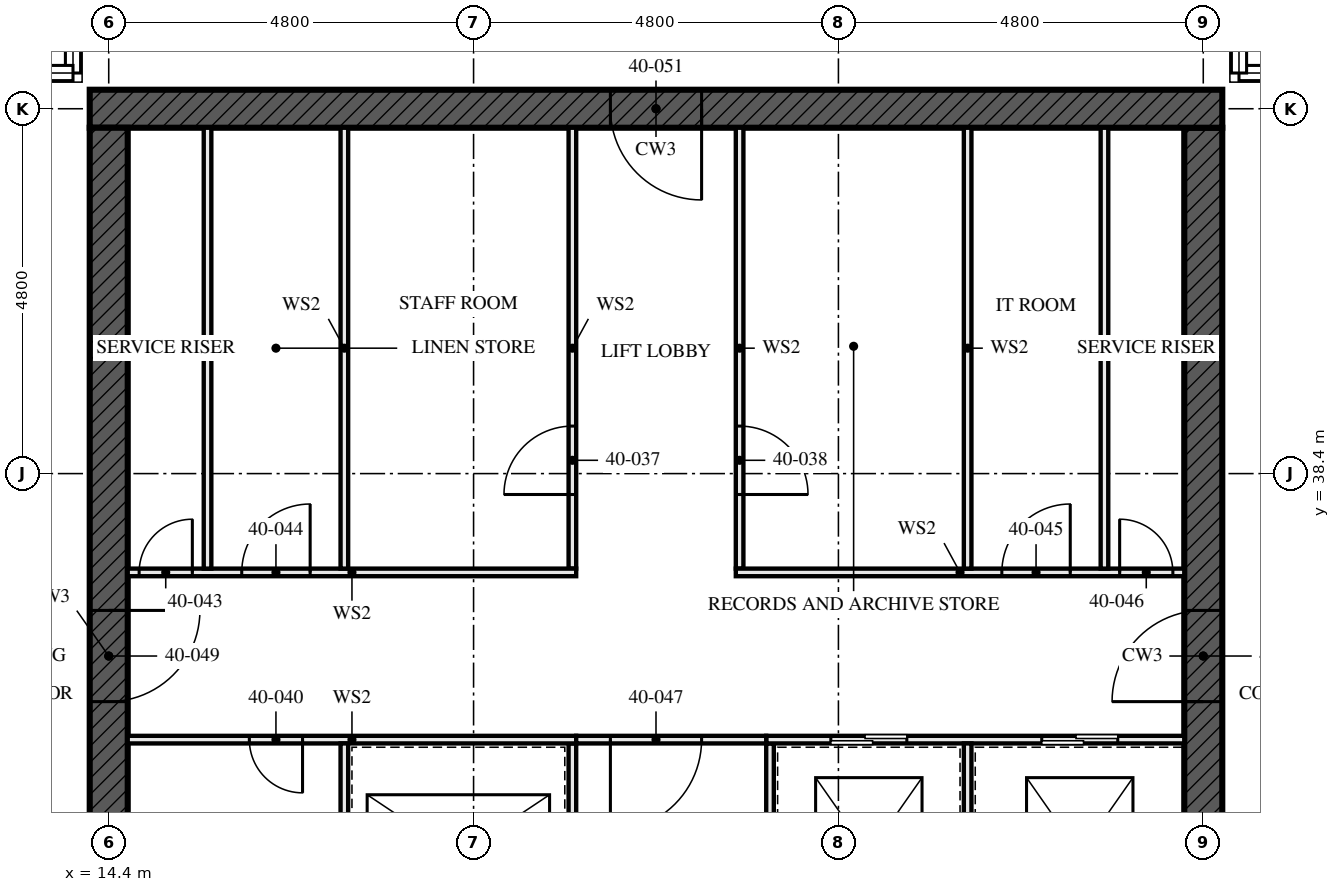
"""IFC4 building model, lengths in metres.
Left out: names, types, materials, properties, quantities, classifications, styles, units other than length and angle.
Written with IfcOpenShell. Run it as: python <this file> out.ifc"""

import sys

from ifc_helpers import new_model, si_unit, direction, frame, frame_2d, origin, place, context, subcontext, project, spatial, rectangle, extrude, element, fill, save


model = new_model("IFC4")
c1 = context("Model", 3, precision=1e-05, world=origin(), true_north=direction((0.0, 1.0)))
c2 = subcontext(c1, "Body", "Model", "MODEL_VIEW")
j1 = project(units=[si_unit("LENGTHUNIT", "METRE"), si_unit("PLANEANGLEUNIT", "RADIAN")], contexts=[c1])
p1 = place(None, origin())
s1 = spatial("IfcSite", under=j1, at=p1, CompositionType="ELEMENT")
p2 = place(p1, origin())
s2 = spatial("IfcBuilding", under=s1, at=p2, CompositionType="ELEMENT")
p3 = place(p2, frame((0.0, 0.0, 148.0)))
s3 = spatial("IfcBuildingStorey", under=s2, at=p3, CompositionType="ELEMENT", Elevation=148.0)
p4 = place(p3, frame((29.05, 43.2, -0.17), z_axis=(0.0, 0.0, 1.0), x_axis=(-1.0, 0.0, 0.0)))
e1 = element("IfcWall", 1, at=p4, inside=s3, PredefinedType="SHEAR", context=c2, shape_type="SweptSolid", body=[
    extrude(rectangle(XDim=14.9, YDim=0.5, at=frame_2d((7.45, 0.0))), origin(), (0.0, 0.0, 1.0), 3.5),
])
p5 = place(p4, frame((6.85, 0.0, 0.17)))
e2 = element("IfcOpeningElement", 2, at=p5, cuts=e1, PredefinedType="OPENING", context=c2, shape_type="SweptSolid", body=[
    extrude(rectangle(XDim=1.2, YDim=2.1, at=frame_2d((0.6, 1.05))), frame((0.0, 0.26, 0.0), z_axis=(0.0, -1.0, 0.0), x_axis=(1.0, 0.0, 0.0)), (0.0, 0.0, 1.0), 0.521),
])
p6 = place(p3, frame((14.4, 42.95, -0.17), z_axis=(0.0, 0.0, 1.0), x_axis=(0.0, -1.0, 0.0)))
e3 = element("IfcWall", 3, at=p6, inside=s3, PredefinedType="SHEAR", context=c2, shape_type="SweptSolid", body=[
    extrude(rectangle(XDim=13.9, YDim=0.5, at=frame_2d((6.95, 0.0))), origin(), (0.0, 0.0, 1.0), 3.5),
])
p7 = place(p6, frame((6.35, 0.0, 0.17)))
e4 = element("IfcOpeningElement", 4, at=p7, cuts=e3, PredefinedType="OPENING", context=c2, shape_type="SweptSolid", body=[
    extrude(rectangle(XDim=1.2, YDim=2.1, at=frame_2d((0.6, 1.05))), frame((0.0, 0.26, 0.0), z_axis=(0.0, -1.0, 0.0), x_axis=(1.0, 0.0, 0.0)), (0.0, 0.0, 1.0), 0.521),
])
p8 = place(p3, frame((28.8, 29.05, -0.17), z_axis=(0.0, 0.0, 1.0), x_axis=(0.0, 1.0, 0.0)))
e5 = element("IfcWall", 5, at=p8, inside=s3, PredefinedType="SHEAR", context=c2, shape_type="SweptSolid", body=[
    extrude(rectangle(XDim=13.9, YDim=0.5, at=frame_2d((6.95, 0.0))), origin(), (0.0, 0.0, 1.0), 3.5),
])
p9 = place(p8, frame((6.35, 0.0, 0.17)))
e6 = element("IfcOpeningElement", 6, at=p9, cuts=e5, PredefinedType="OPENING", context=c2, shape_type="SweptSolid", body=[
    extrude(rectangle(XDim=1.2, YDim=2.1, at=frame_2d((0.6, 1.05))), frame((0.0, 0.26, 0.0), z_axis=(0.0, -1.0, 0.0), x_axis=(1.0, 0.0, 0.0)), (0.0, 0.0, 1.0), 0.521),
])
for number, where, z_axis, x_axis in (
    (7, (15.7, 37.15, 0.0), (0.0, 0.0, 1.0), (0.0, 1.0, 0.0)),
    (8, (27.5, 37.15, 0.0), (0.0, 0.0, 1.0), (0.0, 1.0, 0.0)),
):
    element("IfcWall", number, at=place(p3, frame(where, z_axis=z_axis, x_axis=x_axis)), inside=s3, PredefinedType="SOLIDWALL", context=c2, shape_type="SweptSolid", body=[
        extrude(rectangle(XDim=5.8, YDim=0.1, at=frame_2d((2.9, 0.0))), origin(), (0.0, 0.0, 1.0), 3.33),
    ])
p10 = place(p3, frame((20.5, 29.05, 0.0), z_axis=(0.0, 0.0, 1.0), x_axis=(0.0, 1.0, 0.0)))
e9 = element("IfcWall", 9, at=p10, inside=s3, PredefinedType="SOLIDWALL", context=c2, shape_type="SweptSolid", body=[
    extrude(rectangle(XDim=5.8, YDim=0.1, at=frame_2d((2.9, 0.0))), origin(), (0.0, 0.0, 1.0), 3.33),
])
p11 = place(p10, frame((0.8, 0.0, 0.0)))
e10 = element("IfcOpeningElement", 10, at=p11, cuts=e9, PredefinedType="OPENING", context=c2, shape_type="SweptSolid", body=[
    extrude(rectangle(XDim=1.1, YDim=2.3, at=frame_2d((0.55, 1.15))), frame((0.0, 0.061, 0.0), z_axis=(0.0, -1.0, 0.0), x_axis=(1.0, 0.0, 0.0)), (0.0, 0.0, 1.0), 0.121),
])
p12 = place(p10, frame((3.775, 0.0, 0.0)))
e11 = element("IfcOpeningElement", 11, at=p12, cuts=e9, PredefinedType="OPENING", context=c2, shape_type="SweptSolid", body=[
    extrude(rectangle(XDim=1.1, YDim=2.3, at=frame_2d((0.55, 1.15))), frame((0.0, 0.061, 0.0), z_axis=(0.0, -1.0, 0.0), x_axis=(1.0, 0.0, 0.0)), (0.0, 0.0, 1.0), 0.121),
])
p13 = place(p3, frame((20.5, 37.15, 0.0), z_axis=(0.0, 0.0, 1.0), x_axis=(0.0, 1.0, 0.0)))
e12 = element("IfcWall", 12, at=p13, inside=s3, PredefinedType="SOLIDWALL", context=c2, shape_type="SweptSolid", body=[
    extrude(rectangle(XDim=5.8, YDim=0.1, at=frame_2d((2.9, 0.0))), origin(), (0.0, 0.0, 1.0), 3.33),
])
p14 = place(p13, frame((0.975, 0.0, 0.0)))
e13 = element("IfcOpeningElement", 13, at=p14, cuts=e12, PredefinedType="OPENING", context=c2, shape_type="SweptSolid", body=[
    extrude(rectangle(XDim=0.9, YDim=2.1, at=frame_2d((0.45, 1.05))), frame((0.0, 0.061, 0.0), z_axis=(0.0, -1.0, 0.0), x_axis=(1.0, 0.0, 0.0)), (0.0, 0.0, 1.0), 0.121),
])
p15 = place(p3, frame((22.7, 37.15, 0.0), z_axis=(0.0, 0.0, 1.0), x_axis=(0.0, 1.0, 0.0)))
e14 = element("IfcWall", 14, at=p15, inside=s3, PredefinedType="SOLIDWALL", context=c2, shape_type="SweptSolid", body=[
    extrude(rectangle(XDim=5.8, YDim=0.1, at=frame_2d((2.9, 0.0))), origin(), (0.0, 0.0, 1.0), 3.33),
])
p16 = place(p15, frame((0.975, 0.0, 0.0)))
e15 = element("IfcOpeningElement", 15, at=p16, cuts=e14, PredefinedType="OPENING", context=c2, shape_type="SweptSolid", body=[
    extrude(rectangle(XDim=0.9, YDim=2.1, at=frame_2d((0.45, 1.05))), frame((0.0, 0.061, 0.0), z_axis=(0.0, -1.0, 0.0), x_axis=(1.0, 0.0, 0.0)), (0.0, 0.0, 1.0), 0.121),
])
p17 = place(p3, frame((23.1, 29.05, 0.0), z_axis=(0.0, 0.0, 1.0), x_axis=(0.0, 1.0, 0.0)))
e16 = element("IfcWall", 16, at=p17, inside=s3, PredefinedType="SOLIDWALL", context=c2, shape_type="SweptSolid", body=[
    extrude(rectangle(XDim=5.8, YDim=0.1, at=frame_2d((2.9, 0.0))), origin(), (0.0, 0.0, 1.0), 3.33),
])
p18 = place(p17, frame((1.0, 0.0, 0.0)))
e17 = element("IfcOpeningElement", 17, at=p18, cuts=e16, PredefinedType="OPENING", context=c2, shape_type="SweptSolid", body=[
    extrude(rectangle(XDim=0.7, YDim=2.1, at=frame_2d((0.35, 1.05))), frame((0.0, 0.061, 0.0), z_axis=(0.0, -1.0, 0.0), x_axis=(1.0, 0.0, 0.0)), (0.0, 0.0, 1.0), 0.121),
])
p19 = place(p3, frame((14.65, 34.9, 0.0), z_axis=(0.0, 0.0, 1.0), x_axis=(1.0, 0.0, 0.0)))
e18 = element("IfcWall", 18, at=p19, inside=s3, PredefinedType="SOLIDWALL", context=c2, shape_type="SweptSolid", body=[
    extrude(rectangle(XDim=5.9, YDim=0.1, at=frame_2d((2.95, 0.0))), origin(), (0.0, 0.0, 1.0), 3.33),
])
p20 = place(p19, frame((1.6, 0.0, 0.0)))
e19 = element("IfcOpeningElement", 19, at=p20, cuts=e18, PredefinedType="OPENING", context=c2, shape_type="SweptSolid", body=[
    extrude(rectangle(XDim=0.7, YDim=2.1, at=frame_2d((0.35, 1.05))), frame((0.0, 0.061, 0.0), z_axis=(0.0, -1.0, 0.0), x_axis=(1.0, 0.0, 0.0)), (0.0, 0.0, 1.0), 0.121),
])
p21 = place(p3, frame((23.05, 34.9, 0.0), z_axis=(0.0, 0.0, 1.0), x_axis=(1.0, 0.0, 0.0)))
e20 = element("IfcWall", 20, at=p21, inside=s3, PredefinedType="SOLIDWALL", context=c2, shape_type="SweptSolid", body=[
    extrude(rectangle(XDim=5.5, YDim=0.1, at=frame_2d((2.75, 0.0))), origin(), (0.0, 0.0, 1.0), 3.33),
])
p22 = place(p21, frame((0.85, 0.0, 0.0)))
e21 = element("IfcOpeningElement", 21, at=p22, cuts=e20, PredefinedType="OPENING", context=c2, shape_type="SweptSolid", body=[
    extrude(rectangle(XDim=1.0, YDim=2.1, at=frame_2d((0.5, 1.05))), frame((0.0, 0.061, 0.0), z_axis=(0.0, -1.0, 0.0), x_axis=(1.0, 0.0, 0.0)), (0.0, 0.0, 1.0), 0.121),
])
p23 = place(p21, frame((3.625, 0.0, 0.0)))
e22 = element("IfcOpeningElement", 22, at=p23, cuts=e20, PredefinedType="OPENING", context=c2, shape_type="SweptSolid", body=[
    extrude(rectangle(XDim=1.0, YDim=2.1, at=frame_2d((0.5, 1.05))), frame((0.0, 0.061, 0.0), z_axis=(0.0, -1.0, 0.0), x_axis=(1.0, 0.0, 0.0)), (0.0, 0.0, 1.0), 0.121),
])
p24 = place(p3, frame((14.65, 37.1, 0.0), z_axis=(0.0, 0.0, 1.0), x_axis=(1.0, 0.0, 0.0)))
e23 = element("IfcWall", 23, at=p24, inside=s3, PredefinedType="SOLIDWALL", context=c2, shape_type="SweptSolid", body=[
    extrude(rectangle(XDim=5.9, YDim=0.1, at=frame_2d((2.95, 0.0))), origin(), (0.0, 0.0, 1.0), 3.33),
])
p25 = place(p24, frame((0.15, 0.0, 0.0)))
e24 = element("IfcOpeningElement", 24, at=p25, cuts=e23, PredefinedType="OPENING", context=c2, shape_type="SweptSolid", body=[
    extrude(rectangle(XDim=0.7, YDim=2.1, at=frame_2d((0.35, 1.05))), frame((0.0, 0.061, 0.0), z_axis=(0.0, -1.0, 0.0), x_axis=(1.0, 0.0, 0.0)), (0.0, 0.0, 1.0), 0.121),
])
p26 = place(p24, frame((1.5, 0.0, 0.0)))
e25 = element("IfcOpeningElement", 25, at=p26, cuts=e23, PredefinedType="OPENING", context=c2, shape_type="SweptSolid", body=[
    extrude(rectangle(XDim=0.9, YDim=2.1, at=frame_2d((0.45, 1.05))), frame((0.0, 0.061, 0.0), z_axis=(0.0, -1.0, 0.0), x_axis=(1.0, 0.0, 0.0)), (0.0, 0.0, 1.0), 0.121),
])
p27 = place(p3, frame((22.65, 37.1, 0.0), z_axis=(0.0, 0.0, 1.0), x_axis=(1.0, 0.0, 0.0)))
e26 = element("IfcWall", 26, at=p27, inside=s3, PredefinedType="SOLIDWALL", context=c2, shape_type="SweptSolid", body=[
    extrude(rectangle(XDim=5.9, YDim=0.1, at=frame_2d((2.95, 0.0))), origin(), (0.0, 0.0, 1.0), 3.33),
])
p28 = place(p27, frame((3.5, 0.0, 0.0)))
e27 = element("IfcOpeningElement", 27, at=p28, cuts=e26, PredefinedType="OPENING", context=c2, shape_type="SweptSolid", body=[
    extrude(rectangle(XDim=0.9, YDim=2.1, at=frame_2d((0.45, 1.05))), frame((0.0, 0.061, 0.0), z_axis=(0.0, -1.0, 0.0), x_axis=(1.0, 0.0, 0.0)), (0.0, 0.0, 1.0), 0.121),
])
p29 = place(p27, frame((5.05, 0.0, 0.0)))
e28 = element("IfcOpeningElement", 28, at=p29, cuts=e26, PredefinedType="OPENING", context=c2, shape_type="SweptSolid", body=[
    extrude(rectangle(XDim=0.7, YDim=2.1, at=frame_2d((0.35, 1.05))), frame((0.0, 0.061, 0.0), z_axis=(0.0, -1.0, 0.0), x_axis=(1.0, 0.0, 0.0)), (0.0, 0.0, 1.0), 0.121),
])
p30 = place(p3, frame((20.55, 34.9, 0.0), z_axis=(0.0, 0.0, 1.0), x_axis=(1.0, 0.0, 0.0)))
e29 = element("IfcWall", 29, at=p30, inside=s3, PredefinedType="SOLIDWALL", context=c2, shape_type="SweptSolid", body=[
    extrude(rectangle(XDim=2.5, YDim=0.1, at=frame_2d((1.25, 0.0))), origin(), (0.0, 0.0, 1.0), 3.33),
])
p31 = place(p30, frame((0.45, 0.0, 0.0)))
e30 = element("IfcOpeningElement", 30, at=p31, cuts=e29, PredefinedType="OPENING", context=c2, shape_type="SweptSolid", body=[
    extrude(rectangle(XDim=1.2, YDim=2.1, at=frame_2d((0.6, 1.05))), frame((0.0, 0.061, 0.0), z_axis=(0.0, -1.0, 0.0), x_axis=(1.0, 0.0, 0.0)), (0.0, 0.0, 1.0), 0.121),
])
for number, where, z_axis, x_axis in (
    (31, (17.5, 29.05, 0.0), (0.0, 0.0, 1.0), (0.0, 1.0, 0.0)),
    (32, (17.5, 37.15, 0.0), (0.0, 0.0, 1.0), (0.0, 1.0, 0.0)),
    (33, (25.7, 37.15, 0.0), (0.0, 0.0, 1.0), (0.0, 1.0, 0.0)),
):
    element("IfcWall", number, at=place(p3, frame(where, z_axis=z_axis, x_axis=x_axis)), inside=s3, PredefinedType="SOLIDWALL", context=c2, shape_type="SweptSolid", body=[
        extrude(rectangle(XDim=5.8, YDim=0.1, at=frame_2d((2.9, 0.0))), origin(), (0.0, 0.0, 1.0), 3.33),
    ])
p32 = place(p3, frame((25.7, 31.95, 0.0), z_axis=(0.0, 0.0, 1.0), x_axis=(0.0, 1.0, 0.0)))
e34 = element("IfcWall", 34, at=p32, inside=s3, PredefinedType="SOLIDWALL", context=c2, shape_type="SweptSolid", body=[
    extrude(rectangle(XDim=2.9, YDim=0.1, at=frame_2d((1.45, 0.0))), origin(), (0.0, 0.0, 1.0), 3.33),
])
p33 = place(p14, origin())
e35 = element("IfcDoor", 35, at=p33, inside=s3, OperationType="SINGLE_SWING_RIGHT", PredefinedType="DOOR", context=c2, shape_type="SweptSolid", body=[
    extrude(rectangle(XDim=0.9, YDim=2.1, at=frame_2d((0.45, 1.05))), frame((0.0, 0.027, 0.0), z_axis=(0.0, -1.0, 0.0), x_axis=(1.0, 0.0, 0.0)), (0.0, 0.0, 1.0), 0.054),
])
fill(e13, e35)
p34 = place(p16, frame((0.9, 0.0, 0.0), z_axis=(0.0, 0.0, 1.0), x_axis=(-1.0, 0.0, 0.0)))
e36 = element("IfcDoor", 36, at=p34, inside=s3, OperationType="SINGLE_SWING_LEFT", PredefinedType="DOOR", context=c2, shape_type="SweptSolid", body=[
    extrude(rectangle(XDim=0.9, YDim=2.1, at=frame_2d((0.45, 1.05))), frame((0.0, 0.027, 0.0), z_axis=(0.0, -1.0, 0.0), x_axis=(1.0, 0.0, 0.0)), (0.0, 0.0, 1.0), 0.054),
])
fill(e15, e36)
p35 = place(p20, frame((0.7, 0.0, 0.0), z_axis=(0.0, 0.0, 1.0), x_axis=(-1.0, 0.0, 0.0)))
e37 = element("IfcDoor", 37, at=p35, inside=s3, OperationType="SINGLE_SWING_RIGHT", PredefinedType="DOOR", context=c2, shape_type="SweptSolid", body=[
    extrude(rectangle(XDim=0.7, YDim=2.1, at=frame_2d((0.35, 1.05))), frame((0.0, 0.027, 0.0), z_axis=(0.0, -1.0, 0.0), x_axis=(1.0, 0.0, 0.0)), (0.0, 0.0, 1.0), 0.054),
])
fill(e19, e37)
p36 = place(p22, origin())
e38 = element("IfcDoor", 38, at=p36, inside=s3, OperationType="SLIDING_TO_LEFT", PredefinedType="DOOR", context=c2, shape_type="SweptSolid", body=[
    extrude(rectangle(XDim=1.0, YDim=2.1, at=frame_2d((0.5, 1.05))), frame((0.0, 0.05, 0.0), z_axis=(0.0, -1.0, 0.0), x_axis=(1.0, 0.0, 0.0)), (0.0, 0.0, 1.0), 0.1),
])
fill(e21, e38)
p37 = place(p23, origin())
e39 = element("IfcDoor", 39, at=p37, inside=s3, OperationType="SLIDING_TO_LEFT", PredefinedType="DOOR", context=c2, shape_type="SweptSolid", body=[
    extrude(rectangle(XDim=1.0, YDim=2.1, at=frame_2d((0.5, 1.05))), frame((0.0, 0.05, 0.0), z_axis=(0.0, -1.0, 0.0), x_axis=(1.0, 0.0, 0.0)), (0.0, 0.0, 1.0), 0.1),
])
fill(e22, e39)
p38 = place(p25, origin())
e40 = element("IfcDoor", 40, at=p38, inside=s3, OperationType="SINGLE_SWING_LEFT", PredefinedType="DOOR", context=c2, shape_type="SweptSolid", body=[
    extrude(rectangle(XDim=0.7, YDim=2.1, at=frame_2d((0.35, 1.05))), frame((0.0, 0.027, 0.0), z_axis=(0.0, -1.0, 0.0), x_axis=(1.0, 0.0, 0.0)), (0.0, 0.0, 1.0), 0.054),
])
fill(e24, e40)
p39 = place(p26, origin())
e41 = element("IfcDoor", 41, at=p39, inside=s3, OperationType="SINGLE_SWING_LEFT", PredefinedType="DOOR", context=c2, shape_type="SweptSolid", body=[
    extrude(rectangle(XDim=0.9, YDim=2.1, at=frame_2d((0.45, 1.05))), frame((0.0, 0.027, 0.0), z_axis=(0.0, -1.0, 0.0), x_axis=(1.0, 0.0, 0.0)), (0.0, 0.0, 1.0), 0.054),
])
fill(e25, e41)
p40 = place(p28, origin())
e42 = element("IfcDoor", 42, at=p40, inside=s3, OperationType="SINGLE_SWING_LEFT", PredefinedType="DOOR", context=c2, shape_type="SweptSolid", body=[
    extrude(rectangle(XDim=0.9, YDim=2.1, at=frame_2d((0.45, 1.05))), frame((0.0, 0.027, 0.0), z_axis=(0.0, -1.0, 0.0), x_axis=(1.0, 0.0, 0.0)), (0.0, 0.0, 1.0), 0.054),
])
fill(e27, e42)
p41 = place(p29, origin())
e43 = element("IfcDoor", 43, at=p41, inside=s3, OperationType="SINGLE_SWING_RIGHT", PredefinedType="DOOR", context=c2, shape_type="SweptSolid", body=[
    extrude(rectangle(XDim=0.7, YDim=2.1, at=frame_2d((0.35, 1.05))), frame((0.0, 0.027, 0.0), z_axis=(0.0, -1.0, 0.0), x_axis=(1.0, 0.0, 0.0)), (0.0, 0.0, 1.0), 0.054),
])
fill(e28, e43)
p42 = place(p31, frame((1.2, 0.0, 0.0), z_axis=(0.0, 0.0, 1.0), x_axis=(-1.0, 0.0, 0.0)))
e44 = element("IfcDoor", 44, at=p42, inside=s3, OperationType="SINGLE_SWING_LEFT", PredefinedType="DOOR", context=c2, shape_type="SweptSolid", body=[
    extrude(rectangle(XDim=1.2, YDim=2.1, at=frame_2d((0.6, 1.05))), frame((0.0, 0.027, 0.0), z_axis=(0.0, -1.0, 0.0), x_axis=(1.0, 0.0, 0.0)), (0.0, 0.0, 1.0), 0.054),
])
fill(e30, e44)
p43 = place(p7, origin())
e45 = element("IfcDoor", 45, at=p43, inside=s3, OperationType="SINGLE_SWING_LEFT", PredefinedType="DOOR", context=c2, shape_type="SweptSolid", body=[
    extrude(rectangle(XDim=1.2, YDim=2.1, at=frame_2d((0.6, 1.05))), frame((0.0, 0.027, 0.0), z_axis=(0.0, -1.0, 0.0), x_axis=(1.0, 0.0, 0.0)), (0.0, 0.0, 1.0), 0.054),
])
fill(e4, e45)
p44 = place(p9, origin())
e46 = element("IfcDoor", 46, at=p44, inside=s3, OperationType="SINGLE_SWING_LEFT", PredefinedType="DOOR", context=c2, shape_type="SweptSolid", body=[
    extrude(rectangle(XDim=1.2, YDim=2.1, at=frame_2d((0.6, 1.05))), frame((0.0, 0.027, 0.0), z_axis=(0.0, -1.0, 0.0), x_axis=(1.0, 0.0, 0.0)), (0.0, 0.0, 1.0), 0.054),
])
fill(e6, e46)
p45 = place(p5, origin())
e47 = element("IfcDoor", 47, at=p45, inside=s3, OperationType="SINGLE_SWING_LEFT", PredefinedType="DOOR", context=c2, shape_type="SweptSolid", body=[
    extrude(rectangle(XDim=1.2, YDim=2.1, at=frame_2d((0.6, 1.05))), frame((0.0, 0.027, 0.0), z_axis=(0.0, -1.0, 0.0), x_axis=(1.0, 0.0, 0.0)), (0.0, 0.0, 1.0), 0.054),
])
fill(e2, e47)
save(model, sys.argv[1])
